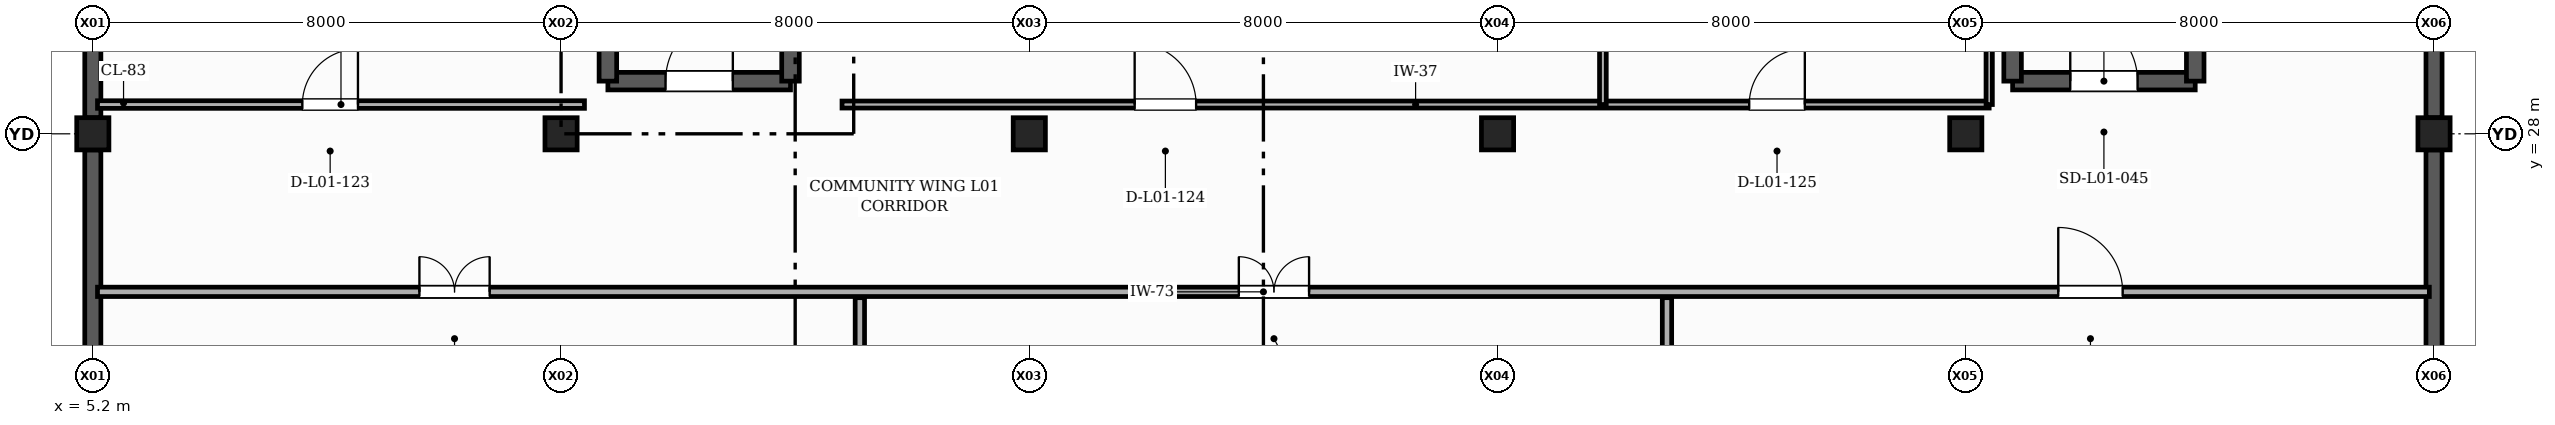
"""IFC4 building model, lengths in metres.
Left out: names, types, materials, properties, quantities, classifications, styles, units other than length and angle.
Written with IfcOpenShell. Run it as: python <this file> out.ifc"""

import sys

from ifc_helpers import new_model, si_unit, direction, frame, frame_2d, origin, origin_2d, place, context, subcontext, project, spatial, rectangle, extrude, element, fill, save


model = new_model("IFC4")
c1 = context("Model", 3, precision=1e-05, world=origin(), true_north=direction((0.0, 1.0)))
c2 = subcontext(c1, "Body", "Model", "MODEL_VIEW")
j1 = project(units=[si_unit("LENGTHUNIT", "METRE"), si_unit("PLANEANGLEUNIT", "RADIAN")], contexts=[c1])
p1 = place(None, origin())
s1 = spatial("IfcSite", under=j1, at=p1, CompositionType="ELEMENT")
p2 = place(p1, origin())
s2 = spatial("IfcBuilding", under=s1, at=p2, CompositionType="ELEMENT")
p3 = place(p2, frame((0.0, 0.0, 4.8)))
s3 = spatial("IfcBuildingStorey", under=s2, at=p3, CompositionType="ELEMENT", Elevation=4.8)
for number, where, z_axis, x_axis in (
    (1, (5.2, 28.0, 0.0), (0.0, 0.0, 1.0), (1.0, 0.0, 0.0)),
    (2, (13.2, 28.0, 0.0), (0.0, 0.0, 1.0), (1.0, 0.0, 0.0)),
    (3, (21.2, 28.0, 0.0), (0.0, 0.0, 1.0), (1.0, 0.0, 0.0)),
    (4, (29.2, 28.0, 0.0), (0.0, 0.0, 1.0), (1.0, 0.0, 0.0)),
    (5, (37.2, 28.0, 0.0), (0.0, 0.0, 1.0), (1.0, 0.0, 0.0)),
    (6, (45.2, 28.0, 0.0), (0.0, 0.0, 1.0), (1.0, 0.0, 0.0)),
):
    element("IfcColumn", number, at=place(p3, frame(where, z_axis=z_axis, x_axis=x_axis)), inside=s3, PredefinedType="COLUMN", context=c2, shape_type="SweptSolid", body=[
        extrude(rectangle(XDim=0.55, YDim=0.55, at=origin_2d()), origin(), (0.0, 0.0, 1.0), 4.2),
    ])
for number, where, z_axis, x_axis in (
    (7, (45.2, 20.275, 0.0), (0.0, 0.0, 1.0), (0.0, 1.0, 0.0)),
    (8, (45.2, 28.275, 0.0), (0.0, 0.0, 1.0), (0.0, 1.0, 0.0)),
):
    element("IfcWall", number, at=place(p3, frame(where, z_axis=z_axis, x_axis=x_axis)), inside=s3, PredefinedType="SOLIDWALL", context=c2, shape_type="SweptSolid", body=[
        extrude(rectangle(XDim=7.45, YDim=0.275, at=frame_2d((3.725, 0.0))), origin(), (0.0, 0.0, 1.0), 3.26),
    ])
p4 = place(p3, frame((5.2, 35.725, 0.0), z_axis=(0.0, 0.0, 1.0), x_axis=(0.0, -1.0, 0.0)))
e9 = element("IfcWall", 9, at=p4, inside=s3, PredefinedType="SOLIDWALL", context=c2, shape_type="SweptSolid", body=[
    extrude(rectangle(XDim=7.45, YDim=0.275, at=frame_2d((3.725, 0.0))), origin(), (0.0, 0.0, 1.0), 3.26),
])
p5 = place(p4, frame((2.625, 0.0, 0.9)))
e10 = element("IfcOpeningElement", 10, at=p5, cuts=e9, PredefinedType="OPENING", context=c2, shape_type="SweptSolid", body=[
    extrude(rectangle(XDim=2.2, YDim=1.6, at=frame_2d((1.1, 0.8))), frame((0.0, 0.147, 0.0), z_axis=(0.0, -1.0, 0.0), x_axis=(1.0, 0.0, 0.0)), (0.0, 0.0, 1.0), 0.295),
])
p6 = place(p3, frame((5.2, 27.725, 0.0), z_axis=(0.0, 0.0, 1.0), x_axis=(0.0, -1.0, 0.0)))
e11 = element("IfcWall", 11, at=p6, inside=s3, PredefinedType="SOLIDWALL", context=c2, shape_type="SweptSolid", body=[
    extrude(rectangle(XDim=7.45, YDim=0.275, at=frame_2d((3.725, 0.0))), origin(), (0.0, 0.0, 1.0), 3.26),
])
p7 = place(p3, frame((14.0, 28.9, 0.0), z_axis=(0.0, 0.0, 1.0), x_axis=(1.0, 0.0, 0.0)))
e12 = element("IfcWall", 12, at=p7, inside=s3, PredefinedType="SHEAR", context=c2, shape_type="SweptSolid", body=[
    extrude(rectangle(XDim=3.12, YDim=0.3, at=frame_2d((1.56, 0.0))), origin(), (0.0, 0.0, 1.0), 4.2),
])
p8 = place(p7, frame((0.985, 0.0, 0.0)))
e13 = element("IfcOpeningElement", 13, at=p8, cuts=e12, PredefinedType="OPENING", context=c2, shape_type="SweptSolid", body=[
    extrude(rectangle(XDim=1.15, YDim=2.15, at=frame_2d((0.575, 1.075))), frame((0.0, 0.16, 0.0), z_axis=(0.0, -1.0, 0.0), x_axis=(1.0, 0.0, 0.0)), (0.0, 0.0, 1.0), 0.32),
])
for number, where, z_axis, x_axis in (
    (14, (17.12, 28.9, 0.0), (0.0, 0.0, 1.0), (0.0, 1.0, 0.0)),
    (15, (14.0, 36.0, 0.0), (0.0, 0.0, 1.0), (0.0, -1.0, 0.0)),
):
    element("IfcWall", number, at=place(p3, frame(where, z_axis=z_axis, x_axis=x_axis)), inside=s3, PredefinedType="SHEAR", context=c2, shape_type="SweptSolid", body=[
        extrude(rectangle(XDim=7.1, YDim=0.3, at=frame_2d((3.55, 0.0))), origin(), (0.0, 0.0, 1.0), 4.2),
    ])
p9 = place(p3, frame((38.0, 28.9, 0.0), z_axis=(0.0, 0.0, 1.0), x_axis=(1.0, 0.0, 0.0)))
e16 = element("IfcWall", 16, at=p9, inside=s3, PredefinedType="SHEAR", context=c2, shape_type="SweptSolid", body=[
    extrude(rectangle(XDim=3.12, YDim=0.3, at=frame_2d((1.56, 0.0))), origin(), (0.0, 0.0, 1.0), 4.2),
])
p10 = place(p9, frame((0.985, 0.0, 0.0)))
e17 = element("IfcOpeningElement", 17, at=p10, cuts=e16, PredefinedType="OPENING", context=c2, shape_type="SweptSolid", body=[
    extrude(rectangle(XDim=1.15, YDim=2.15, at=frame_2d((0.575, 1.075))), frame((0.0, 0.16, 0.0), z_axis=(0.0, -1.0, 0.0), x_axis=(1.0, 0.0, 0.0)), (0.0, 0.0, 1.0), 0.32),
])
for number, where, z_axis, x_axis in (
    (18, (41.12, 28.9, 0.0), (0.0, 0.0, 1.0), (0.0, 1.0, 0.0)),
    (19, (38.0, 36.0, 0.0), (0.0, 0.0, 1.0), (0.0, -1.0, 0.0)),
):
    element("IfcWall", number, at=place(p3, frame(where, z_axis=z_axis, x_axis=x_axis)), inside=s3, PredefinedType="SHEAR", context=c2, shape_type="SweptSolid", body=[
        extrude(rectangle(XDim=7.1, YDim=0.3, at=frame_2d((3.55, 0.0))), origin(), (0.0, 0.0, 1.0), 4.2),
    ])
p11 = place(p3, frame((18.305, 12.08, 0.0), z_axis=(0.0, 0.0, 1.0), x_axis=(0.0, 1.0, 0.0)))
e20 = element("IfcWall", 20, at=p11, inside=s3, PredefinedType="PARTITIONING", context=c2, shape_type="SweptSolid", body=[
    extrude(rectangle(XDim=13.12, YDim=0.16, at=frame_2d((6.56, 0.0))), origin(), (0.0, 0.0, 1.0), 3.145),
])
p12 = place(p3, frame((32.095, 12.08, 0.0), z_axis=(0.0, 0.0, 1.0), x_axis=(0.0, 1.0, 0.0)))
e21 = element("IfcWall", 21, at=p12, inside=s3, PredefinedType="PARTITIONING", context=c2, shape_type="SweptSolid", body=[
    extrude(rectangle(XDim=13.12, YDim=0.16, at=frame_2d((6.56, 0.0))), origin(), (0.0, 0.0, 1.0), 3.045),
])
p13 = place(p3, frame((5.28, 25.3, 0.0), z_axis=(0.0, 0.0, 1.0), x_axis=(1.0, 0.0, 0.0)))
e22 = element("IfcWall", 22, at=p13, inside=s3, PredefinedType="PARTITIONING", context=c2, shape_type="SweptSolid", body=[
    extrude(rectangle(XDim=39.84, YDim=0.16, at=frame_2d((19.92, 0.0))), origin(), (0.0, 0.0, 1.0), 3.045),
])
p14 = place(p13, frame((5.5, 0.0, 0.0)))
e23 = element("IfcOpeningElement", 23, at=p14, cuts=e22, PredefinedType="OPENING", context=c2, shape_type="SweptSolid", body=[
    extrude(rectangle(XDim=1.2, YDim=2.2, at=frame_2d((0.6, 1.1))), frame((0.0, 0.09, 0.0), z_axis=(0.0, -1.0, 0.0), x_axis=(1.0, 0.0, 0.0)), (0.0, 0.0, 1.0), 0.18),
])
p15 = place(p13, frame((19.5, 0.0, 0.0)))
e24 = element("IfcOpeningElement", 24, at=p15, cuts=e22, PredefinedType="OPENING", context=c2, shape_type="SweptSolid", body=[
    extrude(rectangle(XDim=1.2, YDim=2.2, at=frame_2d((0.6, 1.1))), frame((0.0, 0.09, 0.0), z_axis=(0.0, -1.0, 0.0), x_axis=(1.0, 0.0, 0.0)), (0.0, 0.0, 1.0), 0.18),
])
p16 = place(p13, frame((33.5, 0.0, 0.0)))
e25 = element("IfcOpeningElement", 25, at=p16, cuts=e22, PredefinedType="OPENING", context=c2, shape_type="SweptSolid", body=[
    extrude(rectangle(XDim=1.1, YDim=2.1, at=frame_2d((0.55, 1.05))), frame((0.0, 0.09, 0.0), z_axis=(0.0, -1.0, 0.0), x_axis=(1.0, 0.0, 0.0)), (0.0, 0.0, 1.0), 0.18),
])
p17 = place(p3, frame((5.28, 28.5, 0.0), z_axis=(0.0, 0.0, 1.0), x_axis=(1.0, 0.0, 0.0)))
e26 = element("IfcWall", 26, at=p17, inside=s3, PredefinedType="PARTITIONING", context=c2, shape_type="SweptSolid", body=[
    extrude(rectangle(XDim=8.32, YDim=0.13, at=frame_2d((4.16, 0.0))), origin(), (0.0, 0.0, 1.0), 3.195),
])
p18 = place(p17, frame((3.5, 0.0, 0.0)))
e27 = element("IfcOpeningElement", 27, at=p18, cuts=e26, PredefinedType="OPENING", context=c2, shape_type="SweptSolid", body=[
    extrude(rectangle(XDim=0.95, YDim=2.1, at=frame_2d((0.475, 1.05))), frame((0.0, 0.075, 0.0), z_axis=(0.0, -1.0, 0.0), x_axis=(1.0, 0.0, 0.0)), (0.0, 0.0, 1.0), 0.15),
])
p19 = place(p3, frame((18.0, 28.5, 0.0), z_axis=(0.0, 0.0, 1.0), x_axis=(1.0, 0.0, 0.0)))
e28 = element("IfcWall", 28, at=p19, inside=s3, PredefinedType="PARTITIONING", context=c2, shape_type="SweptSolid", body=[
    extrude(rectangle(XDim=19.6, YDim=0.12, at=frame_2d((9.8, 0.0))), origin(), (0.0, 0.0, 1.0), 3.195),
])
p20 = place(p19, frame((5.0, 0.0, 0.0)))
e29 = element("IfcOpeningElement", 29, at=p20, cuts=e28, PredefinedType="OPENING", context=c2, shape_type="SweptSolid", body=[
    extrude(rectangle(XDim=1.05, YDim=2.1, at=frame_2d((0.525, 1.05))), frame((0.0, 0.07, 0.0), z_axis=(0.0, -1.0, 0.0), x_axis=(1.0, 0.0, 0.0)), (0.0, 0.0, 1.0), 0.14),
])
p21 = place(p19, frame((15.5, 0.0, 0.0)))
e30 = element("IfcOpeningElement", 30, at=p21, cuts=e28, PredefinedType="OPENING", context=c2, shape_type="SweptSolid", body=[
    extrude(rectangle(XDim=0.95, YDim=2.15, at=frame_2d((0.475, 1.075))), frame((0.0, 0.07, 0.0), z_axis=(0.0, -1.0, 0.0), x_axis=(1.0, 0.0, 0.0)), (0.0, 0.0, 1.0), 0.14),
])
p22 = place(p3, frame((31.0, 28.5, 0.0), z_axis=(0.0, 0.0, 1.0), x_axis=(0.0, 1.0, 0.0)))
e31 = element("IfcWall", 31, at=p22, inside=s3, PredefinedType="PARTITIONING", context=c2, shape_type="SweptSolid", body=[
    extrude(rectangle(XDim=7.5, YDim=0.115, at=frame_2d((3.75, 0.0))), origin(), (0.0, 0.0, 1.0), 3.145),
])
p23 = place(p3, frame((37.6, 28.5, 0.0), z_axis=(0.0, 0.0, 1.0), x_axis=(0.0, 1.0, 0.0)))
e32 = element("IfcWall", 32, at=p23, inside=s3, PredefinedType="PARTITIONING", context=c2, shape_type="SweptSolid", body=[
    extrude(rectangle(XDim=7.5, YDim=0.108, at=frame_2d((3.75, 0.0))), origin(), (0.0, 0.0, 1.0), 3.91),
])
p24 = place(p8, origin())
e33 = element("IfcDoor", 33, at=p24, inside=s3, OperationType="SINGLE_SWING_RIGHT", PredefinedType="DOOR", context=c2, shape_type="SweptSolid", body=[
    extrude(rectangle(XDim=1.15, YDim=2.15, at=frame_2d((0.575, 1.075))), frame((0.0, 0.025, 0.0), z_axis=(0.0, -1.0, 0.0), x_axis=(1.0, 0.0, 0.0)), (0.0, 0.0, 1.0), 0.05),
])
fill(e13, e33)
p25 = place(p10, origin())
e34 = element("IfcDoor", 34, at=p25, inside=s3, OperationType="SINGLE_SWING_LEFT", PredefinedType="DOOR", context=c2, shape_type="SweptSolid", body=[
    extrude(rectangle(XDim=1.15, YDim=2.15, at=frame_2d((0.575, 1.075))), frame((0.0, 0.025, 0.0), z_axis=(0.0, -1.0, 0.0), x_axis=(1.0, 0.0, 0.0)), (0.0, 0.0, 1.0), 0.05),
])
fill(e17, e34)
p26 = place(p14, origin())
e35 = element("IfcDoor", 35, at=p26, inside=s3, OperationType="DOUBLE_DOOR_SINGLE_SWING", PredefinedType="DOOR", context=c2, shape_type="SweptSolid", body=[
    extrude(rectangle(XDim=1.2, YDim=2.2, at=frame_2d((0.6, 1.1))), frame((0.0, 0.025, 0.0), z_axis=(0.0, -1.0, 0.0), x_axis=(1.0, 0.0, 0.0)), (0.0, 0.0, 1.0), 0.05),
])
fill(e23, e35)
p27 = place(p15, origin())
e36 = element("IfcDoor", 36, at=p27, inside=s3, OperationType="DOUBLE_DOOR_SINGLE_SWING", PredefinedType="DOOR", context=c2, shape_type="SweptSolid", body=[
    extrude(rectangle(XDim=1.2, YDim=2.2, at=frame_2d((0.6, 1.1))), frame((0.0, 0.025, 0.0), z_axis=(0.0, -1.0, 0.0), x_axis=(1.0, 0.0, 0.0)), (0.0, 0.0, 1.0), 0.05),
])
fill(e24, e36)
p28 = place(p16, origin())
e37 = element("IfcDoor", 37, at=p28, inside=s3, OperationType="SINGLE_SWING_LEFT", PredefinedType="DOOR", context=c2, shape_type="SweptSolid", body=[
    extrude(rectangle(XDim=1.1, YDim=2.1, at=frame_2d((0.55, 1.05))), frame((0.0, 0.025, 0.0), z_axis=(0.0, -1.0, 0.0), x_axis=(1.0, 0.0, 0.0)), (0.0, 0.0, 1.0), 0.05),
])
fill(e25, e37)
p29 = place(p18, origin())
e38 = element("IfcDoor", 38, at=p29, inside=s3, OperationType="SINGLE_SWING_RIGHT", PredefinedType="DOOR", context=c2, shape_type="SweptSolid", body=[
    extrude(rectangle(XDim=0.95, YDim=2.1, at=frame_2d((0.475, 1.05))), frame((0.0, 0.025, 0.0), z_axis=(0.0, -1.0, 0.0), x_axis=(1.0, 0.0, 0.0)), (0.0, 0.0, 1.0), 0.05),
])
fill(e27, e38)
p30 = place(p20, origin())
e39 = element("IfcDoor", 39, at=p30, inside=s3, OperationType="SINGLE_SWING_LEFT", PredefinedType="DOOR", context=c2, shape_type="SweptSolid", body=[
    extrude(rectangle(XDim=1.05, YDim=2.1, at=frame_2d((0.525, 1.05))), frame((0.0, 0.025, 0.0), z_axis=(0.0, -1.0, 0.0), x_axis=(1.0, 0.0, 0.0)), (0.0, 0.0, 1.0), 0.05),
])
fill(e29, e39)
p31 = place(p21, origin())
e40 = element("IfcDoor", 40, at=p31, inside=s3, OperationType="SINGLE_SWING_RIGHT", PredefinedType="DOOR", context=c2, shape_type="SweptSolid", body=[
    extrude(rectangle(XDim=0.95, YDim=2.15, at=frame_2d((0.475, 1.075))), frame((0.0, 0.025, 0.0), z_axis=(0.0, -1.0, 0.0), x_axis=(1.0, 0.0, 0.0)), (0.0, 0.0, 1.0), 0.05),
])
fill(e30, e40)
save(model, sys.argv[1])
